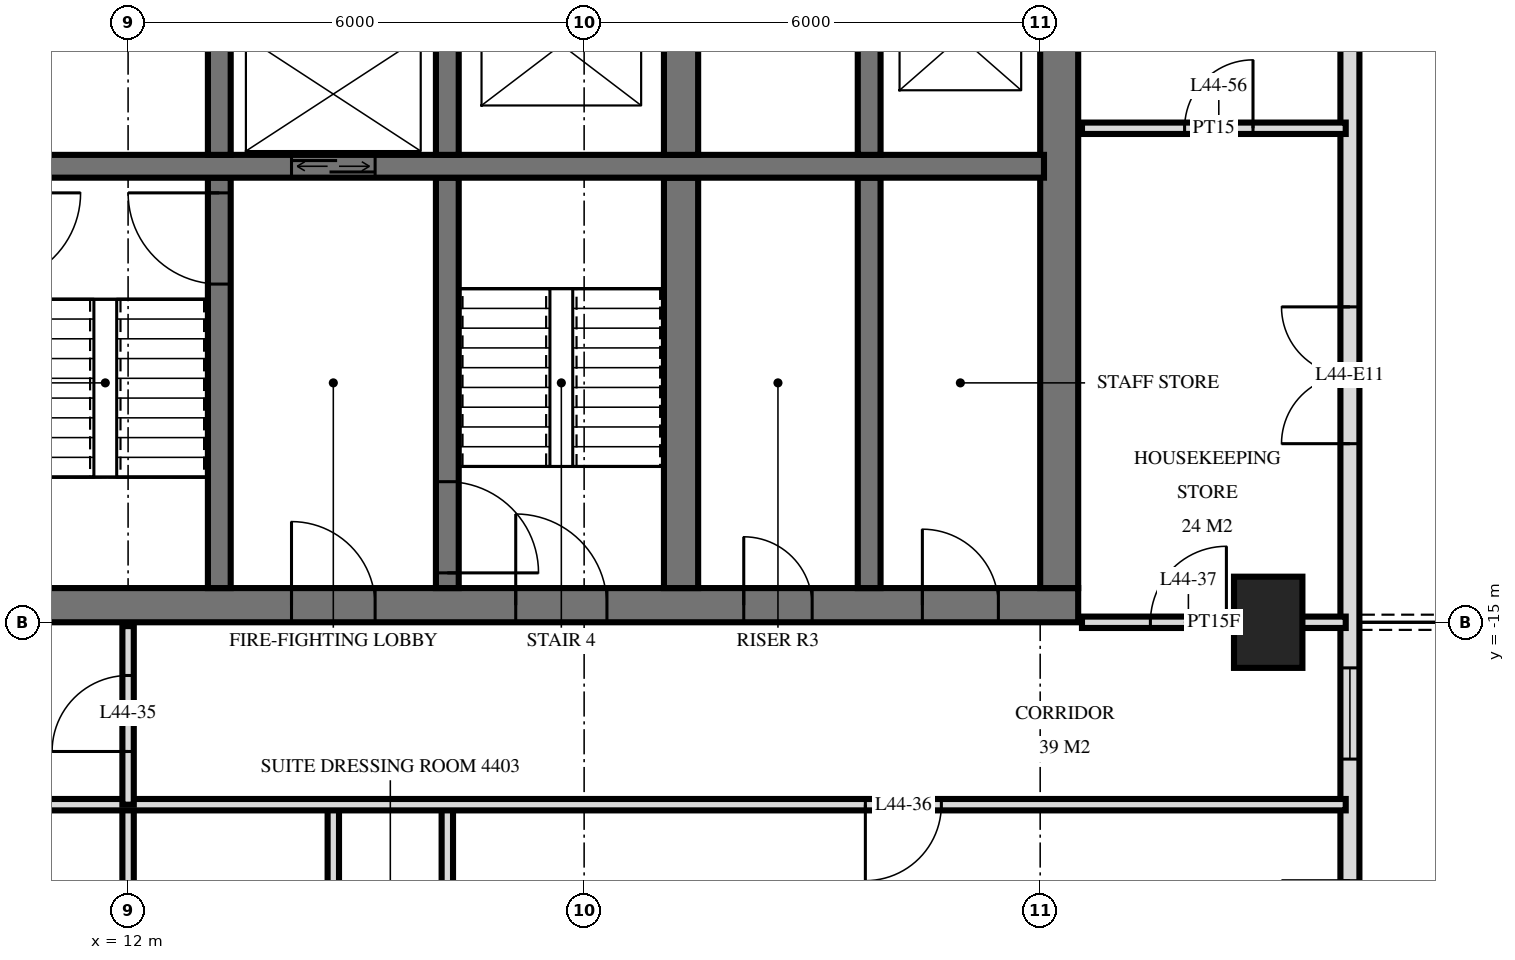
"""IFC4 building model, lengths in metres.
Left out: names, types, materials, properties, quantities, classifications, styles, units other than length and angle.
Written with IfcOpenShell. Run it as: python <this file> out.ifc"""

import sys

from ifc_helpers import new_model, si_unit, direction, frame, frame_2d, origin, origin_2d, place, context, subcontext, project, spatial, rectangle, extrude, element, fill, save


model = new_model("IFC4")
c1 = context("Model", 3, precision=1e-05, world=origin(), true_north=direction((0.0, 1.0)))
c2 = subcontext(c1, "Body", "Model", "MODEL_VIEW")
j1 = project(units=[si_unit("LENGTHUNIT", "METRE"), si_unit("PLANEANGLEUNIT", "RADIAN")], contexts=[c1])
p1 = place(None, origin())
s1 = spatial("IfcSite", under=j1, at=p1, CompositionType="ELEMENT")
p2 = place(p1, origin())
s2 = spatial("IfcBuilding", under=s1, at=p2, CompositionType="ELEMENT")
p3 = place(p2, frame((0.0, 0.0, 170.4)))
s3 = spatial("IfcBuildingStorey", under=s2, at=p3, CompositionType="ELEMENT", Elevation=170.4)
p4 = place(p3, frame((27.0, -15.0, 0.0), z_axis=(0.0, 0.0, 1.0), x_axis=(0.0, 1.0, 0.0)))
e1 = element("IfcColumn", 1, at=p4, inside=s3, PredefinedType="COLUMN", context=c2, shape_type="SweptSolid", body=[
    extrude(rectangle(XDim=1.2, YDim=0.9, at=origin_2d()), origin(), (0.0, 0.0, 1.0), 3.6),
])
p5 = place(p3, frame((10.0, -14.775, 0.0), z_axis=(0.0, 0.0, 1.0), x_axis=(1.0, 0.0, 0.0)))
e2 = element("IfcWall", 2, at=p5, inside=s3, PredefinedType="SHEAR", context=c2, shape_type="SweptSolid", body=[
    extrude(rectangle(XDim=14.5, YDim=0.45, at=frame_2d((7.25, 0.0))), origin(), (0.0, 0.0, 1.0), 3.6),
])
p6 = place(p5, frame((7.1, 0.0, 0.0)))
e3 = element("IfcOpeningElement", 3, at=p6, cuts=e2, PredefinedType="OPENING", context=c2, shape_type="SweptSolid", body=[
    extrude(rectangle(XDim=1.2, YDim=2.1, at=frame_2d((0.6, 1.05))), frame((0.0, 0.235, 0.0), z_axis=(0.0, -1.0, 0.0), x_axis=(1.0, 0.0, 0.0)), (0.0, 0.0, 1.0), 0.47),
])
p7 = place(p5, frame((4.15, 0.0, 0.0)))
e4 = element("IfcOpeningElement", 4, at=p7, cuts=e2, PredefinedType="OPENING", context=c2, shape_type="SweptSolid", body=[
    extrude(rectangle(XDim=1.1, YDim=2.1, at=frame_2d((0.55, 1.05))), frame((0.0, 0.235, 0.0), z_axis=(0.0, -1.0, 0.0), x_axis=(1.0, 0.0, 0.0)), (0.0, 0.0, 1.0), 0.47),
])
p8 = place(p5, frame((10.1, 0.0, 0.0)))
e5 = element("IfcOpeningElement", 5, at=p8, cuts=e2, PredefinedType="OPENING", context=c2, shape_type="SweptSolid", body=[
    extrude(rectangle(XDim=0.9, YDim=2.1, at=frame_2d((0.45, 1.05))), frame((0.0, 0.235, 0.0), z_axis=(0.0, -1.0, 0.0), x_axis=(1.0, 0.0, 0.0)), (0.0, 0.0, 1.0), 0.47),
])
p9 = place(p5, frame((12.45, 0.0, 0.0)))
e6 = element("IfcOpeningElement", 6, at=p9, cuts=e2, PredefinedType="OPENING", context=c2, shape_type="SweptSolid", body=[
    extrude(rectangle(XDim=1.0, YDim=2.1, at=frame_2d((0.5, 1.05))), frame((0.0, 0.235, 0.0), z_axis=(0.0, -1.0, 0.0), x_axis=(1.0, 0.0, 0.0)), (0.0, 0.0, 1.0), 0.47),
])
p10 = place(p3, frame((24.25, -14.55, 0.0), z_axis=(0.0, 0.0, 1.0), x_axis=(0.0, 1.0, 0.0)))
e7 = element("IfcWall", 7, at=p10, inside=s3, PredefinedType="SHEAR", context=c2, shape_type="SweptSolid", body=[
    extrude(rectangle(XDim=14.1, YDim=0.5, at=frame_2d((7.05, 0.0))), origin(), (0.0, 0.0, 1.0), 3.6),
])
p11 = place(p3, frame((10.35, -9.0, 0.0), z_axis=(0.0, 0.0, 1.0), x_axis=(1.0, 0.0, 0.0)))
e8 = element("IfcWall", 8, at=p11, inside=s3, PredefinedType="SHEAR", context=c2, shape_type="SweptSolid", body=[
    extrude(rectangle(XDim=13.7, YDim=0.3, at=frame_2d((6.85, 0.0))), origin(), (0.0, 0.0, 1.0), 3.6),
])
p12 = place(p11, frame((3.8, 0.0, 0.0)))
e9 = element("IfcOpeningElement", 9, at=p12, cuts=e8, PredefinedType="OPENING", context=c2, shape_type="SweptSolid", body=[
    extrude(rectangle(XDim=1.1, YDim=2.1, at=frame_2d((0.55, 1.05))), frame((0.0, 0.16, 0.0), z_axis=(0.0, -1.0, 0.0), x_axis=(1.0, 0.0, 0.0)), (0.0, 0.0, 1.0), 0.32),
])
p13 = place(p3, frame((13.2, -8.85, 0.0), z_axis=(0.0, 0.0, 1.0), x_axis=(0.0, 1.0, 0.0)))
e10 = element("IfcWall", 10, at=p13, inside=s3, PredefinedType="SHEAR", context=c2, shape_type="SweptSolid", body=[
    extrude(rectangle(XDim=2.3, YDim=0.3, at=frame_2d((1.15, 0.0))), origin(), (0.0, 0.0, 1.0), 3.6),
])
p14 = place(p3, frame((13.2, -14.55, 0.0), z_axis=(0.0, 0.0, 1.0), x_axis=(0.0, 1.0, 0.0)))
e11 = element("IfcWall", 11, at=p14, inside=s3, PredefinedType="SHEAR", context=c2, shape_type="SweptSolid", body=[
    extrude(rectangle(XDim=5.4, YDim=0.3, at=frame_2d((2.7, 0.0))), origin(), (0.0, 0.0, 1.0), 3.6),
])
p15 = place(p14, frame((4.0, 0.0, 0.0)))
e12 = element("IfcOpeningElement", 12, at=p15, cuts=e11, PredefinedType="OPENING", context=c2, shape_type="SweptSolid", body=[
    extrude(rectangle(XDim=1.2, YDim=2.1, at=frame_2d((0.6, 1.05))), frame((0.0, 0.16, 0.0), z_axis=(0.0, -1.0, 0.0), x_axis=(1.0, 0.0, 0.0)), (0.0, 0.0, 1.0), 0.32),
])
p16 = place(p3, frame((16.2, -8.85, 0.0), z_axis=(0.0, 0.0, 1.0), x_axis=(0.0, 1.0, 0.0)))
e13 = element("IfcWall", 13, at=p16, inside=s3, PredefinedType="SHEAR", context=c2, shape_type="SweptSolid", body=[
    extrude(rectangle(XDim=2.3, YDim=0.3, at=frame_2d((1.15, 0.0))), origin(), (0.0, 0.0, 1.0), 3.6),
])
p17 = place(p3, frame((16.2, -14.55, 0.0), z_axis=(0.0, 0.0, 1.0), x_axis=(0.0, 1.0, 0.0)))
e14 = element("IfcWall", 14, at=p17, inside=s3, PredefinedType="SHEAR", context=c2, shape_type="SweptSolid", body=[
    extrude(rectangle(XDim=5.4, YDim=0.3, at=frame_2d((2.7, 0.0))), origin(), (0.0, 0.0, 1.0), 3.6),
])
p18 = place(p17, frame((0.2, 0.0, 0.0)))
e15 = element("IfcOpeningElement", 15, at=p18, cuts=e14, PredefinedType="OPENING", context=c2, shape_type="SweptSolid", body=[
    extrude(rectangle(XDim=1.2, YDim=2.1, at=frame_2d((0.6, 1.05))), frame((0.0, 0.16, 0.0), z_axis=(0.0, -1.0, 0.0), x_axis=(1.0, 0.0, 0.0)), (0.0, 0.0, 1.0), 0.32),
])
p19 = place(p3, frame((19.275, -8.85, 0.0), z_axis=(0.0, 0.0, 1.0), x_axis=(0.0, 1.0, 0.0)))
e16 = element("IfcWall", 16, at=p19, inside=s3, PredefinedType="SHEAR", context=c2, shape_type="SweptSolid", body=[
    extrude(rectangle(XDim=2.3, YDim=0.45, at=frame_2d((1.15, 0.0))), origin(), (0.0, 0.0, 1.0), 3.6),
])
p20 = place(p3, frame((19.275, -14.55, 0.0), z_axis=(0.0, 0.0, 1.0), x_axis=(0.0, 1.0, 0.0)))
e17 = element("IfcWall", 17, at=p20, inside=s3, PredefinedType="SHEAR", context=c2, shape_type="SweptSolid", body=[
    extrude(rectangle(XDim=5.4, YDim=0.45, at=frame_2d((2.7, 0.0))), origin(), (0.0, 0.0, 1.0), 3.6),
])
p21 = place(p3, frame((21.75, -8.85, 0.0), z_axis=(0.0, 0.0, 1.0), x_axis=(0.0, 1.0, 0.0)))
e18 = element("IfcWall", 18, at=p21, inside=s3, PredefinedType="SHEAR", context=c2, shape_type="SweptSolid", body=[
    extrude(rectangle(XDim=2.3, YDim=0.3, at=frame_2d((1.15, 0.0))), origin(), (0.0, 0.0, 1.0), 3.6),
])
p22 = place(p3, frame((21.75, -14.55, 0.0), z_axis=(0.0, 0.0, 1.0), x_axis=(0.0, 1.0, 0.0)))
e19 = element("IfcWall", 19, at=p22, inside=s3, PredefinedType="SHEAR", context=c2, shape_type="SweptSolid", body=[
    extrude(rectangle(XDim=5.4, YDim=0.3, at=frame_2d((2.7, 0.0))), origin(), (0.0, 0.0, 1.0), 3.6),
])
p23 = place(p3, frame((28.075, -29.275, 0.0), z_axis=(0.0, 0.0, 1.0), x_axis=(0.0, 1.0, 0.0)))
e20 = element("IfcWall", 20, at=p23, inside=s3, PredefinedType="SOLIDWALL", context=c2, shape_type="SweptSolid", body=[
    extrude(rectangle(XDim=25.951, YDim=0.25, at=frame_2d((12.975, 0.0))), origin(), (0.0, 0.0, 1.0), 3.32),
])
p24 = place(p23, frame((0.575, 0.0, 0.0)))
e21 = element("IfcOpeningElement", 21, at=p24, cuts=e20, PredefinedType="OPENING", context=c2, shape_type="SweptSolid", body=[
    extrude(rectangle(XDim=1.8, YDim=2.4, at=frame_2d((0.9, 1.2))), frame((0.0, 0.135, 0.0), z_axis=(0.0, -1.0, 0.0), x_axis=(1.0, 0.0, 0.0)), (0.0, 0.0, 1.0), 0.27),
])
p25 = place(p23, frame((3.325, 0.0, 0.3)))
e22 = element("IfcOpeningElement", 22, at=p25, cuts=e20, PredefinedType="OPENING", context=c2, shape_type="SweptSolid", body=[
    extrude(rectangle(XDim=1.8, YDim=2.1, at=frame_2d((0.9, 1.05))), frame((0.0, 0.135, 0.0), z_axis=(0.0, -1.0, 0.0), x_axis=(1.0, 0.0, 0.0)), (0.0, 0.0, 1.0), 0.27),
])
p26 = place(p23, frame((9.075, 0.0, 0.0)))
e23 = element("IfcOpeningElement", 23, at=p26, cuts=e20, PredefinedType="OPENING", context=c2, shape_type="SweptSolid", body=[
    extrude(rectangle(XDim=1.8, YDim=2.4, at=frame_2d((0.9, 1.2))), frame((0.0, 0.135, 0.0), z_axis=(0.0, -1.0, 0.0), x_axis=(1.0, 0.0, 0.0)), (0.0, 0.0, 1.0), 0.27),
])
p27 = place(p23, frame((12.475, 0.0, 0.3)))
e24 = element("IfcOpeningElement", 24, at=p27, cuts=e20, PredefinedType="OPENING", context=c2, shape_type="SweptSolid", body=[
    extrude(rectangle(XDim=1.2, YDim=2.1, at=frame_2d((0.6, 1.05))), frame((0.0, 0.135, 0.0), z_axis=(0.0, -1.0, 0.0), x_axis=(1.0, 0.0, 0.0)), (0.0, 0.0, 1.0), 0.27),
])
p28 = place(p23, frame((16.625, 0.0, 0.0)))
e25 = element("IfcOpeningElement", 25, at=p28, cuts=e20, PredefinedType="OPENING", context=c2, shape_type="SweptSolid", body=[
    extrude(rectangle(XDim=1.8, YDim=2.4, at=frame_2d((0.9, 1.2))), frame((0.0, 0.135, 0.0), z_axis=(0.0, -1.0, 0.0), x_axis=(1.0, 0.0, 0.0)), (0.0, 0.0, 1.0), 0.27),
])
p29 = place(p3, frame((16.2, -21.6, 0.0), z_axis=(0.0, 0.0, 1.0), x_axis=(0.0, 1.0, 0.0)))
e26 = element("IfcWall", 26, at=p29, inside=s3, PredefinedType="PARTITIONING", context=c2, shape_type="SweptSolid", body=[
    extrude(rectangle(XDim=4.2, YDim=0.15, at=frame_2d((2.1, 0.0))), origin(), (0.0, 0.0, 1.0), 3.32),
])
p30 = place(p29, frame((1.65, 0.0, 0.0)))
e27 = element("IfcOpeningElement", 27, at=p30, cuts=e26, PredefinedType="OPENING", context=c2, shape_type="SweptSolid", body=[
    extrude(rectangle(XDim=0.9, YDim=2.1, at=frame_2d((0.45, 1.05))), frame((0.0, 0.085, 0.0), z_axis=(0.0, -1.0, 0.0), x_axis=(1.0, 0.0, 0.0)), (0.0, 0.0, 1.0), 0.17),
])
p31 = place(p3, frame((14.7, -21.6, 0.0), z_axis=(0.0, 0.0, 1.0), x_axis=(0.0, 1.0, 0.0)))
e28 = element("IfcWall", 28, at=p31, inside=s3, PredefinedType="PARTITIONING", context=c2, shape_type="SweptSolid", body=[
    extrude(rectangle(XDim=4.2, YDim=0.15, at=frame_2d((2.1, 0.0))), origin(), (0.0, 0.0, 1.0), 3.32),
])
p32 = place(p3, frame((12.0, -17.4, 0.0), z_axis=(0.0, 0.0, 1.0), x_axis=(0.0, 1.0, 0.0)))
e29 = element("IfcWall", 29, at=p32, inside=s3, PredefinedType="PARTITIONING", context=c2, shape_type="SweptSolid", body=[
    extrude(rectangle(XDim=2.35, YDim=0.15, at=frame_2d((1.175, 0.0))), origin(), (0.0, 0.0, 1.0), 3.32),
])
p33 = place(p32, frame((0.7, 0.0, 0.0)))
e30 = element("IfcOpeningElement", 30, at=p33, cuts=e29, PredefinedType="OPENING", context=c2, shape_type="SweptSolid", body=[
    extrude(rectangle(XDim=1.0, YDim=2.1, at=frame_2d((0.5, 1.05))), frame((0.0, 0.085, 0.0), z_axis=(0.0, -1.0, 0.0), x_axis=(1.0, 0.0, 0.0)), (0.0, 0.0, 1.0), 0.17),
])
p34 = place(p3, frame((12.0, -33.62, 0.0), z_axis=(0.0, 0.0, 1.0), x_axis=(0.0, 1.0, 0.0)))
e31 = element("IfcWall", 31, at=p34, inside=s3, PredefinedType="PARTITIONING", context=c2, shape_type="SweptSolid", body=[
    extrude(rectangle(XDim=16.22, YDim=0.15, at=frame_2d((8.11, 0.0))), origin(), (0.0, 0.0, 1.0), 3.32),
])
p35 = place(p3, frame((-28.02, -17.4, 0.0), z_axis=(0.0, 0.0, 1.0), x_axis=(1.0, 0.0, 0.0)))
e32 = element("IfcWall", 32, at=p35, inside=s3, PredefinedType="PARTITIONING", context=c2, shape_type="SweptSolid", body=[
    extrude(rectangle(XDim=56.04, YDim=0.15, at=frame_2d((28.02, 0.0))), origin(), (0.0, 0.0, 1.0), 3.32),
])
p36 = place(p35, frame((10.42, 0.0, 0.0)))
e33 = element("IfcOpeningElement", 33, at=p36, cuts=e32, PredefinedType="OPENING", context=c2, shape_type="SweptSolid", body=[
    extrude(rectangle(XDim=1.0, YDim=2.1, at=frame_2d((0.5, 1.05))), frame((0.0, 0.085, 0.0), z_axis=(0.0, -1.0, 0.0), x_axis=(1.0, 0.0, 0.0)), (0.0, 0.0, 1.0), 0.17),
])
p37 = place(p35, frame((2.32, 0.0, 0.0)))
e34 = element("IfcOpeningElement", 34, at=p37, cuts=e32, PredefinedType="OPENING", context=c2, shape_type="SweptSolid", body=[
    extrude(rectangle(XDim=1.0, YDim=2.1, at=frame_2d((0.5, 1.05))), frame((0.0, 0.085, 0.0), z_axis=(0.0, -1.0, 0.0), x_axis=(1.0, 0.0, 0.0)), (0.0, 0.0, 1.0), 0.17),
])
p38 = place(p35, frame((49.72, 0.0, 0.0)))
e35 = element("IfcOpeningElement", 35, at=p38, cuts=e32, PredefinedType="OPENING", context=c2, shape_type="SweptSolid", body=[
    extrude(rectangle(XDim=1.0, YDim=2.1, at=frame_2d((0.5, 1.05))), frame((0.0, 0.085, 0.0), z_axis=(0.0, -1.0, 0.0), x_axis=(1.0, 0.0, 0.0)), (0.0, 0.0, 1.0), 0.17),
])
p39 = place(p35, frame((23.02, 0.0, 0.0)))
e36 = element("IfcOpeningElement", 36, at=p39, cuts=e32, PredefinedType="OPENING", context=c2, shape_type="SweptSolid", body=[
    extrude(rectangle(XDim=1.0, YDim=2.1, at=frame_2d((0.5, 1.05))), frame((0.0, 0.085, 0.0), z_axis=(0.0, -1.0, 0.0), x_axis=(1.0, 0.0, 0.0)), (0.0, 0.0, 1.0), 0.17),
])
p40 = place(p35, frame((35.02, 0.0, 0.0)))
e37 = element("IfcOpeningElement", 37, at=p40, cuts=e32, PredefinedType="OPENING", context=c2, shape_type="SweptSolid", body=[
    extrude(rectangle(XDim=1.0, YDim=2.1, at=frame_2d((0.5, 1.05))), frame((0.0, 0.085, 0.0), z_axis=(0.0, -1.0, 0.0), x_axis=(1.0, 0.0, 0.0)), (0.0, 0.0, 1.0), 0.17),
])
p41 = place(p3, frame((24.55, -15.0, 0.0), z_axis=(0.0, 0.0, 1.0), x_axis=(1.0, 0.0, 0.0)))
e38 = element("IfcWall", 38, at=p41, inside=s3, PredefinedType="PARTITIONING", context=c2, shape_type="SweptSolid", body=[
    extrude(rectangle(XDim=3.47, YDim=0.15, at=frame_2d((1.735, 0.0))), origin(), (0.0, 0.0, 1.0), 3.32),
])
p42 = place(p41, frame((0.9, 0.0, 0.0)))
e39 = element("IfcOpeningElement", 39, at=p42, cuts=e38, PredefinedType="OPENING", context=c2, shape_type="SweptSolid", body=[
    extrude(rectangle(XDim=1.0, YDim=2.1, at=frame_2d((0.5, 1.05))), frame((0.0, 0.085, 0.0), z_axis=(0.0, -1.0, 0.0), x_axis=(1.0, 0.0, 0.0)), (0.0, 0.0, 1.0), 0.17),
])
p43 = place(p3, frame((24.55, -8.5, 0.0), z_axis=(0.0, 0.0, 1.0), x_axis=(1.0, 0.0, 0.0)))
e40 = element("IfcWall", 40, at=p43, inside=s3, PredefinedType="PARTITIONING", context=c2, shape_type="SweptSolid", body=[
    extrude(rectangle(XDim=3.47, YDim=0.15, at=frame_2d((1.735, 0.0))), origin(), (0.0, 0.0, 1.0), 3.32),
])
p44 = place(p43, frame((1.35, 0.0, 0.0)))
e41 = element("IfcOpeningElement", 41, at=p44, cuts=e40, PredefinedType="OPENING", context=c2, shape_type="SweptSolid", body=[
    extrude(rectangle(XDim=0.9, YDim=2.1, at=frame_2d((0.45, 1.05))), frame((0.0, 0.085, 0.0), z_axis=(0.0, -1.0, 0.0), x_axis=(1.0, 0.0, 0.0)), (0.0, 0.0, 1.0), 0.17),
])
p45 = place(p27, origin())
e42 = element("IfcWindow", 42, at=p45, inside=s3, PartitioningType="SINGLE_PANEL", PredefinedType="WINDOW", context=c2, shape_type="SweptSolid", body=[
    extrude(rectangle(XDim=1.2, YDim=2.1, at=frame_2d((0.6, 1.05))), frame((0.0, 0.03, 0.0), z_axis=(0.0, -1.0, 0.0), x_axis=(1.0, 0.0, 0.0)), (0.0, 0.0, 1.0), 0.06),
])
fill(e24, e42)
p46 = place(p28, origin())
e43 = element("IfcDoor", 43, at=p46, inside=s3, OperationType="DOUBLE_DOOR_SINGLE_SWING", PredefinedType="DOOR", context=c2, shape_type="SweptSolid", body=[
    extrude(rectangle(XDim=1.8, YDim=2.4, at=frame_2d((0.9, 1.2))), frame((0.0, 0.025, 0.0), z_axis=(0.0, -1.0, 0.0), x_axis=(1.0, 0.0, 0.0)), (0.0, 0.0, 1.0), 0.05),
])
fill(e25, e43)
p47 = place(p12, origin())
e44 = element("IfcDoor", 44, at=p47, inside=s3, OperationType="DOUBLE_DOOR_SLIDING", PredefinedType="USERDEFINED", context=c2, shape_type="SweptSolid", body=[
    extrude(rectangle(XDim=1.1, YDim=2.1, at=frame_2d((0.55, 1.05))), frame((0.0, 0.025, 0.0), z_axis=(0.0, -1.0, 0.0), x_axis=(1.0, 0.0, 0.0)), (0.0, 0.0, 1.0), 0.05),
])
fill(e9, e44)
p48 = place(p6, origin())
e45 = element("IfcDoor", 45, at=p48, inside=s3, OperationType="SINGLE_SWING_RIGHT", PredefinedType="DOOR", context=c2, shape_type="SweptSolid", body=[
    extrude(rectangle(XDim=1.2, YDim=2.1, at=frame_2d((0.6, 1.05))), frame((0.0, 0.025, 0.0), z_axis=(0.0, -1.0, 0.0), x_axis=(1.0, 0.0, 0.0)), (0.0, 0.0, 1.0), 0.05),
])
fill(e3, e45)
p49 = place(p7, origin())
e46 = element("IfcDoor", 46, at=p49, inside=s3, OperationType="SINGLE_SWING_RIGHT", PredefinedType="DOOR", context=c2, shape_type="SweptSolid", body=[
    extrude(rectangle(XDim=1.1, YDim=2.1, at=frame_2d((0.55, 1.05))), frame((0.0, 0.025, 0.0), z_axis=(0.0, -1.0, 0.0), x_axis=(1.0, 0.0, 0.0)), (0.0, 0.0, 1.0), 0.05),
])
fill(e4, e46)
p50 = place(p8, origin())
e47 = element("IfcDoor", 47, at=p50, inside=s3, OperationType="SINGLE_SWING_RIGHT", PredefinedType="DOOR", context=c2, shape_type="SweptSolid", body=[
    extrude(rectangle(XDim=0.9, YDim=2.1, at=frame_2d((0.45, 1.05))), frame((0.0, 0.025, 0.0), z_axis=(0.0, -1.0, 0.0), x_axis=(1.0, 0.0, 0.0)), (0.0, 0.0, 1.0), 0.05),
])
fill(e5, e47)
p51 = place(p9, origin())
e48 = element("IfcDoor", 48, at=p51, inside=s3, OperationType="SINGLE_SWING_RIGHT", PredefinedType="DOOR", context=c2, shape_type="SweptSolid", body=[
    extrude(rectangle(XDim=1.0, YDim=2.1, at=frame_2d((0.5, 1.05))), frame((0.0, 0.025, 0.0), z_axis=(0.0, -1.0, 0.0), x_axis=(1.0, 0.0, 0.0)), (0.0, 0.0, 1.0), 0.05),
])
fill(e6, e48)
p52 = place(p15, origin())
e49 = element("IfcDoor", 49, at=p52, inside=s3, OperationType="SINGLE_SWING_LEFT", PredefinedType="DOOR", context=c2, shape_type="SweptSolid", body=[
    extrude(rectangle(XDim=1.2, YDim=2.1, at=frame_2d((0.6, 1.05))), frame((0.0, 0.025, 0.0), z_axis=(0.0, -1.0, 0.0), x_axis=(1.0, 0.0, 0.0)), (0.0, 0.0, 1.0), 0.05),
])
fill(e12, e49)
p53 = place(p18, frame((0.6, 0.0, 0.0), z_axis=(0.0, 0.0, 1.0), x_axis=(-1.0, 0.0, 0.0)))
e50 = element("IfcDoor", 50, at=p53, inside=s3, OperationType="SINGLE_SWING_LEFT", PredefinedType="DOOR", context=c2, shape_type="SweptSolid", body=[
    extrude(rectangle(XDim=1.2, YDim=2.1, at=frame_2d((0.0, 1.05))), frame((0.0, -0.025, 0.0), z_axis=(0.0, 1.0, 0.0), x_axis=(-1.0, 0.0, 0.0)), (0.0, 0.0, 1.0), 0.05),
])
fill(e15, e50)
p54 = place(p33, origin())
e51 = element("IfcDoor", 51, at=p54, inside=s3, OperationType="SINGLE_SWING_RIGHT", PredefinedType="DOOR", context=c2, shape_type="SweptSolid", body=[
    extrude(rectangle(XDim=1.0, YDim=2.1, at=frame_2d((0.5, 1.05))), frame((0.0, 0.025, 0.0), z_axis=(0.0, -1.0, 0.0), x_axis=(1.0, 0.0, 0.0)), (0.0, 0.0, 1.0), 0.05),
])
fill(e30, e51)
p55 = place(p38, frame((0.5, 0.0, 0.0), z_axis=(0.0, 0.0, 1.0), x_axis=(-1.0, 0.0, 0.0)))
e52 = element("IfcDoor", 52, at=p55, inside=s3, OperationType="SINGLE_SWING_LEFT", PredefinedType="DOOR", context=c2, shape_type="SweptSolid", body=[
    extrude(rectangle(XDim=1.0, YDim=2.1, at=frame_2d((0.0, 1.05))), frame((0.0, -0.025, 0.0), z_axis=(0.0, 1.0, 0.0), x_axis=(-1.0, 0.0, 0.0)), (0.0, 0.0, 1.0), 0.05),
])
fill(e35, e52)
p56 = place(p42, origin())
e53 = element("IfcDoor", 53, at=p56, inside=s3, OperationType="SINGLE_SWING_LEFT", PredefinedType="DOOR", context=c2, shape_type="SweptSolid", body=[
    extrude(rectangle(XDim=1.0, YDim=2.1, at=frame_2d((0.5, 1.05))), frame((0.0, 0.025, 0.0), z_axis=(0.0, -1.0, 0.0), x_axis=(1.0, 0.0, 0.0)), (0.0, 0.0, 1.0), 0.05),
])
fill(e39, e53)
p57 = place(p44, origin())
e54 = element("IfcDoor", 54, at=p57, inside=s3, OperationType="SINGLE_SWING_LEFT", PredefinedType="DOOR", context=c2, shape_type="SweptSolid", body=[
    extrude(rectangle(XDim=0.9, YDim=2.1, at=frame_2d((0.45, 1.05))), frame((0.0, 0.025, 0.0), z_axis=(0.0, -1.0, 0.0), x_axis=(1.0, 0.0, 0.0)), (0.0, 0.0, 1.0), 0.05),
])
fill(e41, e54)
save(model, sys.argv[1])
